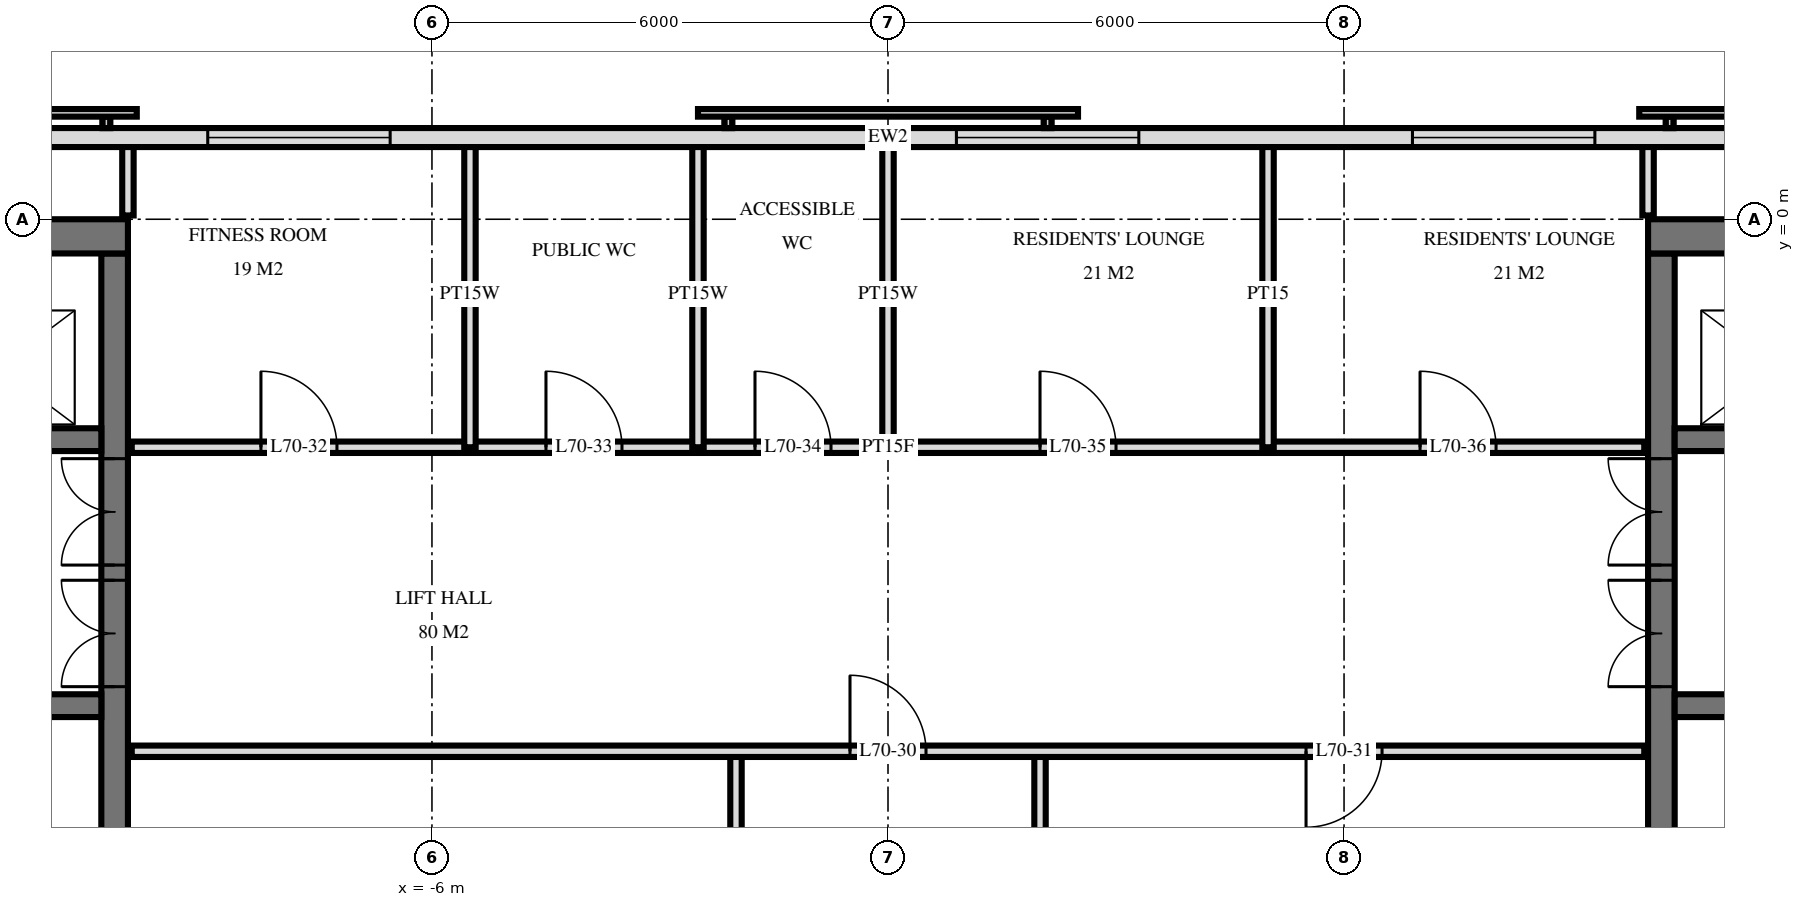
"""IFC4 building model, lengths in metres.
Left out: names, types, materials, properties, quantities, classifications, styles, units other than length and angle.
Written with IfcOpenShell. Run it as: python <this file> out.ifc"""

import sys

from ifc_helpers import new_model, si_unit, direction, frame, frame_2d, origin, place, context, subcontext, project, spatial, rectangle, extrude, element, fill, save


model = new_model("IFC4")
c1 = context("Model", 3, precision=1e-05, world=origin(), true_north=direction((0.0, 1.0)))
c2 = subcontext(c1, "Body", "Model", "MODEL_VIEW")
j1 = project(units=[si_unit("LENGTHUNIT", "METRE"), si_unit("PLANEANGLEUNIT", "RADIAN")], contexts=[c1])
p1 = place(None, origin())
s1 = spatial("IfcSite", under=j1, at=p1, CompositionType="ELEMENT")
p2 = place(p1, origin())
s2 = spatial("IfcBuilding", under=s1, at=p2, CompositionType="ELEMENT")
p3 = place(p2, frame((0.0, 0.0, 266.6)))
s3 = spatial("IfcBuildingStorey", under=s2, at=p3, CompositionType="ELEMENT", Elevation=266.6)
p4 = place(p3, frame((-19.5, -0.225, 0.0), z_axis=(0.0, 0.0, 1.0), x_axis=(1.0, 0.0, 0.0)))
e1 = element("IfcWall", 1, at=p4, inside=s3, PredefinedType="SHEAR", context=c2, shape_type="SweptSolid", body=[
    extrude(rectangle(XDim=9.5, YDim=0.45, at=frame_2d((4.75, 0.0))), origin(), (0.0, 0.0, 1.0), 3.5),
])
p5 = place(p3, frame((-10.175, -14.55, 0.0), z_axis=(0.0, 0.0, 1.0), x_axis=(0.0, 1.0, 0.0)))
e2 = element("IfcWall", 2, at=p5, inside=s3, PredefinedType="SHEAR", context=c2, shape_type="SweptSolid", body=[
    extrude(rectangle(XDim=14.1, YDim=0.35, at=frame_2d((7.05, 0.0))), origin(), (0.0, 0.0, 1.0), 3.5),
])
p6 = place(p5, frame((8.4, 0.0, 0.0)))
e3 = element("IfcOpeningElement", 3, at=p6, cuts=e2, PredefinedType="OPENING", context=c2, shape_type="SweptSolid", body=[
    extrude(rectangle(XDim=1.4, YDim=2.4, at=frame_2d((0.7, 1.2))), frame((0.0, 0.185, 0.0), z_axis=(0.0, -1.0, 0.0), x_axis=(1.0, 0.0, 0.0)), (0.0, 0.0, 1.0), 0.37),
])
p7 = place(p5, frame((10.0, 0.0, 0.0)))
e4 = element("IfcOpeningElement", 4, at=p7, cuts=e2, PredefinedType="OPENING", context=c2, shape_type="SweptSolid", body=[
    extrude(rectangle(XDim=1.4, YDim=2.4, at=frame_2d((0.7, 1.2))), frame((0.0, 0.185, 0.0), z_axis=(0.0, -1.0, 0.0), x_axis=(1.0, 0.0, 0.0)), (0.0, 0.0, 1.0), 0.37),
])
p8 = place(p5, frame((4.0, 0.0, 0.0)))
e5 = element("IfcOpeningElement", 5, at=p8, cuts=e2, PredefinedType="OPENING", context=c2, shape_type="SweptSolid", body=[
    extrude(rectangle(XDim=1.2, YDim=2.1, at=frame_2d((0.6, 1.05))), frame((0.0, 0.185, 0.0), z_axis=(0.0, -1.0, 0.0), x_axis=(1.0, 0.0, 0.0)), (0.0, 0.0, 1.0), 0.37),
])
p9 = place(p3, frame((-19.05, -2.9, 0.0), z_axis=(0.0, 0.0, 1.0), x_axis=(1.0, 0.0, 0.0)))
e6 = element("IfcWall", 6, at=p9, inside=s3, PredefinedType="SHEAR", context=c2, shape_type="SweptSolid", body=[
    extrude(rectangle(XDim=8.7, YDim=0.3, at=frame_2d((4.35, 0.0))), origin(), (0.0, 0.0, 1.0), 3.5),
])
p10 = place(p9, frame((6.8, 0.0, 0.0)))
e7 = element("IfcOpeningElement", 7, at=p10, cuts=e6, PredefinedType="OPENING", context=c2, shape_type="SweptSolid", body=[
    extrude(rectangle(XDim=1.1, YDim=2.1, at=frame_2d((0.55, 1.05))), frame((0.0, 0.16, 0.0), z_axis=(0.0, -1.0, 0.0), x_axis=(1.0, 0.0, 0.0)), (0.0, 0.0, 1.0), 0.32),
])
p11 = place(p9, frame((3.8, 0.0, 0.0)))
e8 = element("IfcOpeningElement", 8, at=p11, cuts=e6, PredefinedType="OPENING", context=c2, shape_type="SweptSolid", body=[
    extrude(rectangle(XDim=1.1, YDim=2.1, at=frame_2d((0.55, 1.05))), frame((0.0, 0.16, 0.0), z_axis=(0.0, -1.0, 0.0), x_axis=(1.0, 0.0, 0.0)), (0.0, 0.0, 1.0), 0.32),
])
p12 = place(p9, frame((0.9, 0.0, 0.0)))
e9 = element("IfcOpeningElement", 9, at=p12, cuts=e6, PredefinedType="OPENING", context=c2, shape_type="SweptSolid", body=[
    extrude(rectangle(XDim=0.9, YDim=2.1, at=frame_2d((0.45, 1.05))), frame((0.0, 0.16, 0.0), z_axis=(0.0, -1.0, 0.0), x_axis=(1.0, 0.0, 0.0)), (0.0, 0.0, 1.0), 0.32),
])
p13 = place(p3, frame((-19.05, -6.4, 0.0), z_axis=(0.0, 0.0, 1.0), x_axis=(1.0, 0.0, 0.0)))
e10 = element("IfcWall", 10, at=p13, inside=s3, PredefinedType="SHEAR", context=c2, shape_type="SweptSolid", body=[
    extrude(rectangle(XDim=8.7, YDim=0.3, at=frame_2d((4.35, 0.0))), origin(), (0.0, 0.0, 1.0), 3.5),
])
p14 = place(p13, frame((0.8, 0.0, 0.0)))
e11 = element("IfcOpeningElement", 11, at=p14, cuts=e10, PredefinedType="OPENING", context=c2, shape_type="SweptSolid", body=[
    extrude(rectangle(XDim=1.1, YDim=2.1, at=frame_2d((0.55, 1.05))), frame((0.0, 0.16, 0.0), z_axis=(0.0, -1.0, 0.0), x_axis=(1.0, 0.0, 0.0)), (0.0, 0.0, 1.0), 0.32),
])
p15 = place(p3, frame((10.0, -0.225, 0.0), z_axis=(0.0, 0.0, 1.0), x_axis=(1.0, 0.0, 0.0)))
e12 = element("IfcWall", 12, at=p15, inside=s3, PredefinedType="SHEAR", context=c2, shape_type="SweptSolid", body=[
    extrude(rectangle(XDim=9.5, YDim=0.45, at=frame_2d((4.75, 0.0))), origin(), (0.0, 0.0, 1.0), 3.5),
])
p16 = place(p3, frame((10.175, -14.55, 0.0), z_axis=(0.0, 0.0, 1.0), x_axis=(0.0, 1.0, 0.0)))
e13 = element("IfcWall", 13, at=p16, inside=s3, PredefinedType="SHEAR", context=c2, shape_type="SweptSolid", body=[
    extrude(rectangle(XDim=14.1, YDim=0.35, at=frame_2d((7.05, 0.0))), origin(), (0.0, 0.0, 1.0), 3.5),
])
p17 = place(p16, frame((8.4, 0.0, 0.0)))
e14 = element("IfcOpeningElement", 14, at=p17, cuts=e13, PredefinedType="OPENING", context=c2, shape_type="SweptSolid", body=[
    extrude(rectangle(XDim=1.4, YDim=2.4, at=frame_2d((0.7, 1.2))), frame((0.0, 0.185, 0.0), z_axis=(0.0, -1.0, 0.0), x_axis=(1.0, 0.0, 0.0)), (0.0, 0.0, 1.0), 0.37),
])
p18 = place(p16, frame((10.0, 0.0, 0.0)))
e15 = element("IfcOpeningElement", 15, at=p18, cuts=e13, PredefinedType="OPENING", context=c2, shape_type="SweptSolid", body=[
    extrude(rectangle(XDim=1.4, YDim=2.4, at=frame_2d((0.7, 1.2))), frame((0.0, 0.185, 0.0), z_axis=(0.0, -1.0, 0.0), x_axis=(1.0, 0.0, 0.0)), (0.0, 0.0, 1.0), 0.37),
])
p19 = place(p16, frame((4.0, 0.0, 0.0)))
e16 = element("IfcOpeningElement", 16, at=p19, cuts=e13, PredefinedType="OPENING", context=c2, shape_type="SweptSolid", body=[
    extrude(rectangle(XDim=1.2, YDim=2.1, at=frame_2d((0.6, 1.05))), frame((0.0, 0.185, 0.0), z_axis=(0.0, -1.0, 0.0), x_axis=(1.0, 0.0, 0.0)), (0.0, 0.0, 1.0), 0.37),
])
p20 = place(p3, frame((10.35, -2.9, 0.0), z_axis=(0.0, 0.0, 1.0), x_axis=(1.0, 0.0, 0.0)))
e17 = element("IfcWall", 17, at=p20, inside=s3, PredefinedType="SHEAR", context=c2, shape_type="SweptSolid", body=[
    extrude(rectangle(XDim=8.7, YDim=0.3, at=frame_2d((4.35, 0.0))), origin(), (0.0, 0.0, 1.0), 3.5),
])
p21 = place(p20, frame((0.8, 0.0, 0.0)))
e18 = element("IfcOpeningElement", 18, at=p21, cuts=e17, PredefinedType="OPENING", context=c2, shape_type="SweptSolid", body=[
    extrude(rectangle(XDim=1.1, YDim=2.1, at=frame_2d((0.55, 1.05))), frame((0.0, 0.16, 0.0), z_axis=(0.0, -1.0, 0.0), x_axis=(1.0, 0.0, 0.0)), (0.0, 0.0, 1.0), 0.32),
])
p22 = place(p20, frame((3.8, 0.0, 0.0)))
e19 = element("IfcOpeningElement", 19, at=p22, cuts=e17, PredefinedType="OPENING", context=c2, shape_type="SweptSolid", body=[
    extrude(rectangle(XDim=1.1, YDim=2.1, at=frame_2d((0.55, 1.05))), frame((0.0, 0.16, 0.0), z_axis=(0.0, -1.0, 0.0), x_axis=(1.0, 0.0, 0.0)), (0.0, 0.0, 1.0), 0.32),
])
p23 = place(p20, frame((6.9, 0.0, 0.0)))
e20 = element("IfcOpeningElement", 20, at=p23, cuts=e17, PredefinedType="OPENING", context=c2, shape_type="SweptSolid", body=[
    extrude(rectangle(XDim=0.9, YDim=2.1, at=frame_2d((0.45, 1.05))), frame((0.0, 0.16, 0.0), z_axis=(0.0, -1.0, 0.0), x_axis=(1.0, 0.0, 0.0)), (0.0, 0.0, 1.0), 0.32),
])
p24 = place(p3, frame((10.35, -6.4, 0.0), z_axis=(0.0, 0.0, 1.0), x_axis=(1.0, 0.0, 0.0)))
e21 = element("IfcWall", 21, at=p24, inside=s3, PredefinedType="SHEAR", context=c2, shape_type="SweptSolid", body=[
    extrude(rectangle(XDim=8.7, YDim=0.3, at=frame_2d((4.35, 0.0))), origin(), (0.0, 0.0, 1.0), 3.5),
])
p25 = place(p24, frame((6.8, 0.0, 0.0)))
e22 = element("IfcOpeningElement", 22, at=p25, cuts=e21, PredefinedType="OPENING", context=c2, shape_type="SweptSolid", body=[
    extrude(rectangle(XDim=1.1, YDim=2.1, at=frame_2d((0.55, 1.05))), frame((0.0, 0.16, 0.0), z_axis=(0.0, -1.0, 0.0), x_axis=(1.0, 0.0, 0.0)), (0.0, 0.0, 1.0), 0.32),
])
p26 = place(p3, frame((18.575, 1.075, 0.0), z_axis=(0.0, 0.0, 1.0), x_axis=(-1.0, 0.0, 0.0)))
e23 = element("IfcWall", 23, at=p26, inside=s3, PredefinedType="SOLIDWALL", context=c2, shape_type="SweptSolid", body=[
    extrude(rectangle(XDim=37.151, YDim=0.25, at=frame_2d((18.575, 0.0))), origin(), (0.0, 0.0, 1.0), 3.22),
])
p27 = place(p26, frame((9.275, 0.0, 0.9)))
e24 = element("IfcOpeningElement", 24, at=p27, cuts=e23, PredefinedType="OPENING", context=c2, shape_type="SweptSolid", body=[
    extrude(rectangle(XDim=2.4, YDim=1.5, at=frame_2d((1.2, 0.75))), frame((0.0, 0.135, 0.0), z_axis=(0.0, -1.0, 0.0), x_axis=(1.0, 0.0, 0.0)), (0.0, 0.0, 1.0), 0.27),
])
p28 = place(p26, frame((15.275, 0.0, 0.9)))
e25 = element("IfcOpeningElement", 25, at=p28, cuts=e23, PredefinedType="OPENING", context=c2, shape_type="SweptSolid", body=[
    extrude(rectangle(XDim=2.4, YDim=1.5, at=frame_2d((1.2, 0.75))), frame((0.0, 0.135, 0.0), z_axis=(0.0, -1.0, 0.0), x_axis=(1.0, 0.0, 0.0)), (0.0, 0.0, 1.0), 0.27),
])
p29 = place(p26, frame((25.125, 0.0, 0.9)))
e26 = element("IfcOpeningElement", 26, at=p29, cuts=e23, PredefinedType="OPENING", context=c2, shape_type="SweptSolid", body=[
    extrude(rectangle(XDim=2.4, YDim=1.5, at=frame_2d((1.2, 0.75))), frame((0.0, 0.135, 0.0), z_axis=(0.0, -1.0, 0.0), x_axis=(1.0, 0.0, 0.0)), (0.0, 0.0, 1.0), 0.27),
])
p30 = place(p3, frame((10.0, 0.05, 0.0), z_axis=(0.0, 0.0, 1.0), x_axis=(0.0, 1.0, 0.0)))
e27 = element("IfcWall", 27, at=p30, inside=s3, PredefinedType="PARTITIONING", context=c2, shape_type="SweptSolid", body=[
    extrude(rectangle(XDim=0.97, YDim=0.15, at=frame_2d((0.485, 0.0))), origin(), (0.0, 0.0, 1.0), 3.22),
])
p31 = place(p3, frame((5.0, -3.0, 0.0), z_axis=(0.0, 0.0, 1.0), x_axis=(0.0, 1.0, 0.0)))
e28 = element("IfcWall", 28, at=p31, inside=s3, PredefinedType="PARTITIONING", context=c2, shape_type="SweptSolid", body=[
    extrude(rectangle(XDim=4.02, YDim=0.15, at=frame_2d((2.01, 0.0))), origin(), (0.0, 0.0, 1.0), 3.22),
])
p32 = place(p3, frame((2.0, -11.0, 0.0), z_axis=(0.0, 0.0, 1.0), x_axis=(0.0, 1.0, 0.0)))
e29 = element("IfcWall", 29, at=p32, inside=s3, PredefinedType="PARTITIONING", context=c2, shape_type="SweptSolid", body=[
    extrude(rectangle(XDim=4.0, YDim=0.15, at=frame_2d((2.0, 0.0))), origin(), (0.0, 0.0, 1.0), 3.22),
])
p33 = place(p3, frame((0.0, -3.0, 0.0), z_axis=(0.0, 0.0, 1.0), x_axis=(0.0, 1.0, 0.0)))
e30 = element("IfcWall", 30, at=p33, inside=s3, PredefinedType="PLUMBINGWALL", context=c2, shape_type="SweptSolid", body=[
    extrude(rectangle(XDim=4.02, YDim=0.15, at=frame_2d((2.01, 0.0))), origin(), (0.0, 0.0, 1.0), 3.22),
])
p34 = place(p3, frame((-2.0, -11.0, 0.0), z_axis=(0.0, 0.0, 1.0), x_axis=(0.0, 1.0, 0.0)))
e31 = element("IfcWall", 31, at=p34, inside=s3, PredefinedType="PARTITIONING", context=c2, shape_type="SweptSolid", body=[
    extrude(rectangle(XDim=4.0, YDim=0.15, at=frame_2d((2.0, 0.0))), origin(), (0.0, 0.0, 1.0), 3.22),
])
for number, where, z_axis, x_axis in (
    (32, (-2.5, -3.0, 0.0), (0.0, 0.0, 1.0), (0.0, 1.0, 0.0)),
    (33, (-5.5, -3.0, 0.0), (0.0, 0.0, 1.0), (0.0, 1.0, 0.0)),
):
    element("IfcWall", number, at=place(p3, frame(where, z_axis=z_axis, x_axis=x_axis)), inside=s3, PredefinedType="PLUMBINGWALL", context=c2, shape_type="SweptSolid", body=[
        extrude(rectangle(XDim=4.02, YDim=0.15, at=frame_2d((2.01, 0.0))), origin(), (0.0, 0.0, 1.0), 3.22),
    ])
p35 = place(p3, frame((-10.0, 0.05, 0.0), z_axis=(0.0, 0.0, 1.0), x_axis=(0.0, 1.0, 0.0)))
e34 = element("IfcWall", 34, at=p35, inside=s3, PredefinedType="PARTITIONING", context=c2, shape_type="SweptSolid", body=[
    extrude(rectangle(XDim=0.97, YDim=0.15, at=frame_2d((0.485, 0.0))), origin(), (0.0, 0.0, 1.0), 3.22),
])
p36 = place(p3, frame((-9.95, -7.0, 0.0), z_axis=(0.0, 0.0, 1.0), x_axis=(1.0, 0.0, 0.0)))
e35 = element("IfcWall", 35, at=p36, inside=s3, PredefinedType="PARTITIONING", context=c2, shape_type="SweptSolid", body=[
    extrude(rectangle(XDim=19.9, YDim=0.15, at=frame_2d((9.95, 0.0))), origin(), (0.0, 0.0, 1.0), 3.22),
])
p37 = place(p36, frame((9.45, 0.0, 0.0)))
e36 = element("IfcOpeningElement", 36, at=p37, cuts=e35, PredefinedType="OPENING", context=c2, shape_type="SweptSolid", body=[
    extrude(rectangle(XDim=1.0, YDim=2.1, at=frame_2d((0.5, 1.05))), frame((0.0, 0.085, 0.0), z_axis=(0.0, -1.0, 0.0), x_axis=(1.0, 0.0, 0.0)), (0.0, 0.0, 1.0), 0.17),
])
p38 = place(p36, frame((15.45, 0.0, 0.0)))
e37 = element("IfcOpeningElement", 37, at=p38, cuts=e35, PredefinedType="OPENING", context=c2, shape_type="SweptSolid", body=[
    extrude(rectangle(XDim=1.0, YDim=2.1, at=frame_2d((0.5, 1.05))), frame((0.0, 0.085, 0.0), z_axis=(0.0, -1.0, 0.0), x_axis=(1.0, 0.0, 0.0)), (0.0, 0.0, 1.0), 0.17),
])
p39 = place(p3, frame((-9.95, -3.0, 0.0), z_axis=(0.0, 0.0, 1.0), x_axis=(1.0, 0.0, 0.0)))
e38 = element("IfcWall", 38, at=p39, inside=s3, PredefinedType="PARTITIONING", context=c2, shape_type="SweptSolid", body=[
    extrude(rectangle(XDim=19.9, YDim=0.15, at=frame_2d((9.95, 0.0))), origin(), (0.0, 0.0, 1.0), 3.22),
])
p40 = place(p39, frame((1.7, 0.0, 0.0)))
e39 = element("IfcOpeningElement", 39, at=p40, cuts=e38, PredefinedType="OPENING", context=c2, shape_type="SweptSolid", body=[
    extrude(rectangle(XDim=1.0, YDim=2.1, at=frame_2d((0.5, 1.05))), frame((0.0, 0.085, 0.0), z_axis=(0.0, -1.0, 0.0), x_axis=(1.0, 0.0, 0.0)), (0.0, 0.0, 1.0), 0.17),
])
p41 = place(p39, frame((5.45, 0.0, 0.0)))
e40 = element("IfcOpeningElement", 40, at=p41, cuts=e38, PredefinedType="OPENING", context=c2, shape_type="SweptSolid", body=[
    extrude(rectangle(XDim=1.0, YDim=2.1, at=frame_2d((0.5, 1.05))), frame((0.0, 0.085, 0.0), z_axis=(0.0, -1.0, 0.0), x_axis=(1.0, 0.0, 0.0)), (0.0, 0.0, 1.0), 0.17),
])
p42 = place(p39, frame((8.2, 0.0, 0.0)))
e41 = element("IfcOpeningElement", 41, at=p42, cuts=e38, PredefinedType="OPENING", context=c2, shape_type="SweptSolid", body=[
    extrude(rectangle(XDim=1.0, YDim=2.1, at=frame_2d((0.5, 1.05))), frame((0.0, 0.085, 0.0), z_axis=(0.0, -1.0, 0.0), x_axis=(1.0, 0.0, 0.0)), (0.0, 0.0, 1.0), 0.17),
])
p43 = place(p39, frame((11.95, 0.0, 0.0)))
e42 = element("IfcOpeningElement", 42, at=p43, cuts=e38, PredefinedType="OPENING", context=c2, shape_type="SweptSolid", body=[
    extrude(rectangle(XDim=1.0, YDim=2.1, at=frame_2d((0.5, 1.05))), frame((0.0, 0.085, 0.0), z_axis=(0.0, -1.0, 0.0), x_axis=(1.0, 0.0, 0.0)), (0.0, 0.0, 1.0), 0.17),
])
p44 = place(p39, frame((16.95, 0.0, 0.0)))
e43 = element("IfcOpeningElement", 43, at=p44, cuts=e38, PredefinedType="OPENING", context=c2, shape_type="SweptSolid", body=[
    extrude(rectangle(XDim=1.0, YDim=2.1, at=frame_2d((0.5, 1.05))), frame((0.0, 0.085, 0.0), z_axis=(0.0, -1.0, 0.0), x_axis=(1.0, 0.0, 0.0)), (0.0, 0.0, 1.0), 0.17),
])
p45 = place(p27, origin())
e44 = element("IfcWindow", 44, at=p45, inside=s3, PartitioningType="SINGLE_PANEL", PredefinedType="WINDOW", context=c2, shape_type="SweptSolid", body=[
    extrude(rectangle(XDim=2.4, YDim=1.5, at=frame_2d((1.2, 0.75))), frame((0.0, 0.03, 0.0), z_axis=(0.0, -1.0, 0.0), x_axis=(1.0, 0.0, 0.0)), (0.0, 0.0, 1.0), 0.06),
])
fill(e24, e44)
p46 = place(p28, origin())
e45 = element("IfcWindow", 45, at=p46, inside=s3, PartitioningType="SINGLE_PANEL", PredefinedType="WINDOW", context=c2, shape_type="SweptSolid", body=[
    extrude(rectangle(XDim=2.4, YDim=1.5, at=frame_2d((1.2, 0.75))), frame((0.0, 0.03, 0.0), z_axis=(0.0, -1.0, 0.0), x_axis=(1.0, 0.0, 0.0)), (0.0, 0.0, 1.0), 0.06),
])
fill(e25, e45)
p47 = place(p29, origin())
e46 = element("IfcWindow", 46, at=p47, inside=s3, PartitioningType="SINGLE_PANEL", PredefinedType="WINDOW", context=c2, shape_type="SweptSolid", body=[
    extrude(rectangle(XDim=2.4, YDim=1.5, at=frame_2d((1.2, 0.75))), frame((0.0, 0.03, 0.0), z_axis=(0.0, -1.0, 0.0), x_axis=(1.0, 0.0, 0.0)), (0.0, 0.0, 1.0), 0.06),
])
fill(e26, e46)
p48 = place(p6, origin())
e47 = element("IfcDoor", 47, at=p48, inside=s3, OperationType="DOUBLE_DOOR_SINGLE_SWING", PredefinedType="DOOR", context=c2, shape_type="SweptSolid", body=[
    extrude(rectangle(XDim=1.4, YDim=2.4, at=frame_2d((0.7, 1.2))), frame((0.0, 0.025, 0.0), z_axis=(0.0, -1.0, 0.0), x_axis=(1.0, 0.0, 0.0)), (0.0, 0.0, 1.0), 0.05),
])
fill(e3, e47)
p49 = place(p7, origin())
e48 = element("IfcDoor", 48, at=p49, inside=s3, OperationType="DOUBLE_DOOR_SINGLE_SWING", PredefinedType="DOOR", context=c2, shape_type="SweptSolid", body=[
    extrude(rectangle(XDim=1.4, YDim=2.4, at=frame_2d((0.7, 1.2))), frame((0.0, 0.025, 0.0), z_axis=(0.0, -1.0, 0.0), x_axis=(1.0, 0.0, 0.0)), (0.0, 0.0, 1.0), 0.05),
])
fill(e4, e48)
p50 = place(p17, origin())
e49 = element("IfcDoor", 49, at=p50, inside=s3, OperationType="DOUBLE_DOOR_SINGLE_SWING", PredefinedType="DOOR", context=c2, shape_type="SweptSolid", body=[
    extrude(rectangle(XDim=1.4, YDim=2.4, at=frame_2d((0.7, 1.2))), frame((0.0, 0.025, 0.0), z_axis=(0.0, -1.0, 0.0), x_axis=(1.0, 0.0, 0.0)), (0.0, 0.0, 1.0), 0.05),
])
fill(e14, e49)
p51 = place(p18, origin())
e50 = element("IfcDoor", 50, at=p51, inside=s3, OperationType="DOUBLE_DOOR_SINGLE_SWING", PredefinedType="DOOR", context=c2, shape_type="SweptSolid", body=[
    extrude(rectangle(XDim=1.4, YDim=2.4, at=frame_2d((0.7, 1.2))), frame((0.0, 0.025, 0.0), z_axis=(0.0, -1.0, 0.0), x_axis=(1.0, 0.0, 0.0)), (0.0, 0.0, 1.0), 0.05),
])
fill(e15, e50)
p52 = place(p37, origin())
e51 = element("IfcDoor", 51, at=p52, inside=s3, OperationType="SINGLE_SWING_RIGHT", PredefinedType="DOOR", context=c2, shape_type="SweptSolid", body=[
    extrude(rectangle(XDim=1.0, YDim=2.1, at=frame_2d((0.5, 1.05))), frame((0.0, 0.025, 0.0), z_axis=(0.0, -1.0, 0.0), x_axis=(1.0, 0.0, 0.0)), (0.0, 0.0, 1.0), 0.05),
])
fill(e36, e51)
p53 = place(p38, frame((0.5, 0.0, 0.0), z_axis=(0.0, 0.0, 1.0), x_axis=(-1.0, 0.0, 0.0)))
e52 = element("IfcDoor", 52, at=p53, inside=s3, OperationType="SINGLE_SWING_LEFT", PredefinedType="DOOR", context=c2, shape_type="SweptSolid", body=[
    extrude(rectangle(XDim=1.0, YDim=2.1, at=frame_2d((0.0, 1.05))), frame((0.0, -0.025, 0.0), z_axis=(0.0, 1.0, 0.0), x_axis=(-1.0, 0.0, 0.0)), (0.0, 0.0, 1.0), 0.05),
])
fill(e37, e52)
p54 = place(p40, origin())
e53 = element("IfcDoor", 53, at=p54, inside=s3, OperationType="SINGLE_SWING_RIGHT", PredefinedType="DOOR", context=c2, shape_type="SweptSolid", body=[
    extrude(rectangle(XDim=1.0, YDim=2.1, at=frame_2d((0.5, 1.05))), frame((0.0, 0.025, 0.0), z_axis=(0.0, -1.0, 0.0), x_axis=(1.0, 0.0, 0.0)), (0.0, 0.0, 1.0), 0.05),
])
fill(e39, e53)
p55 = place(p41, origin())
e54 = element("IfcDoor", 54, at=p55, inside=s3, OperationType="SINGLE_SWING_RIGHT", PredefinedType="DOOR", context=c2, shape_type="SweptSolid", body=[
    extrude(rectangle(XDim=1.0, YDim=2.1, at=frame_2d((0.5, 1.05))), frame((0.0, 0.025, 0.0), z_axis=(0.0, -1.0, 0.0), x_axis=(1.0, 0.0, 0.0)), (0.0, 0.0, 1.0), 0.05),
])
fill(e40, e54)
p56 = place(p42, origin())
e55 = element("IfcDoor", 55, at=p56, inside=s3, OperationType="SINGLE_SWING_RIGHT", PredefinedType="DOOR", context=c2, shape_type="SweptSolid", body=[
    extrude(rectangle(XDim=1.0, YDim=2.1, at=frame_2d((0.5, 1.05))), frame((0.0, 0.025, 0.0), z_axis=(0.0, -1.0, 0.0), x_axis=(1.0, 0.0, 0.0)), (0.0, 0.0, 1.0), 0.05),
])
fill(e41, e55)
p57 = place(p43, origin())
e56 = element("IfcDoor", 56, at=p57, inside=s3, OperationType="SINGLE_SWING_RIGHT", PredefinedType="DOOR", context=c2, shape_type="SweptSolid", body=[
    extrude(rectangle(XDim=1.0, YDim=2.1, at=frame_2d((0.5, 1.05))), frame((0.0, 0.025, 0.0), z_axis=(0.0, -1.0, 0.0), x_axis=(1.0, 0.0, 0.0)), (0.0, 0.0, 1.0), 0.05),
])
fill(e42, e56)
p58 = place(p44, origin())
e57 = element("IfcDoor", 57, at=p58, inside=s3, OperationType="SINGLE_SWING_RIGHT", PredefinedType="DOOR", context=c2, shape_type="SweptSolid", body=[
    extrude(rectangle(XDim=1.0, YDim=2.1, at=frame_2d((0.5, 1.05))), frame((0.0, 0.025, 0.0), z_axis=(0.0, -1.0, 0.0), x_axis=(1.0, 0.0, 0.0)), (0.0, 0.0, 1.0), 0.05),
])
fill(e43, e57)
save(model, sys.argv[1])
